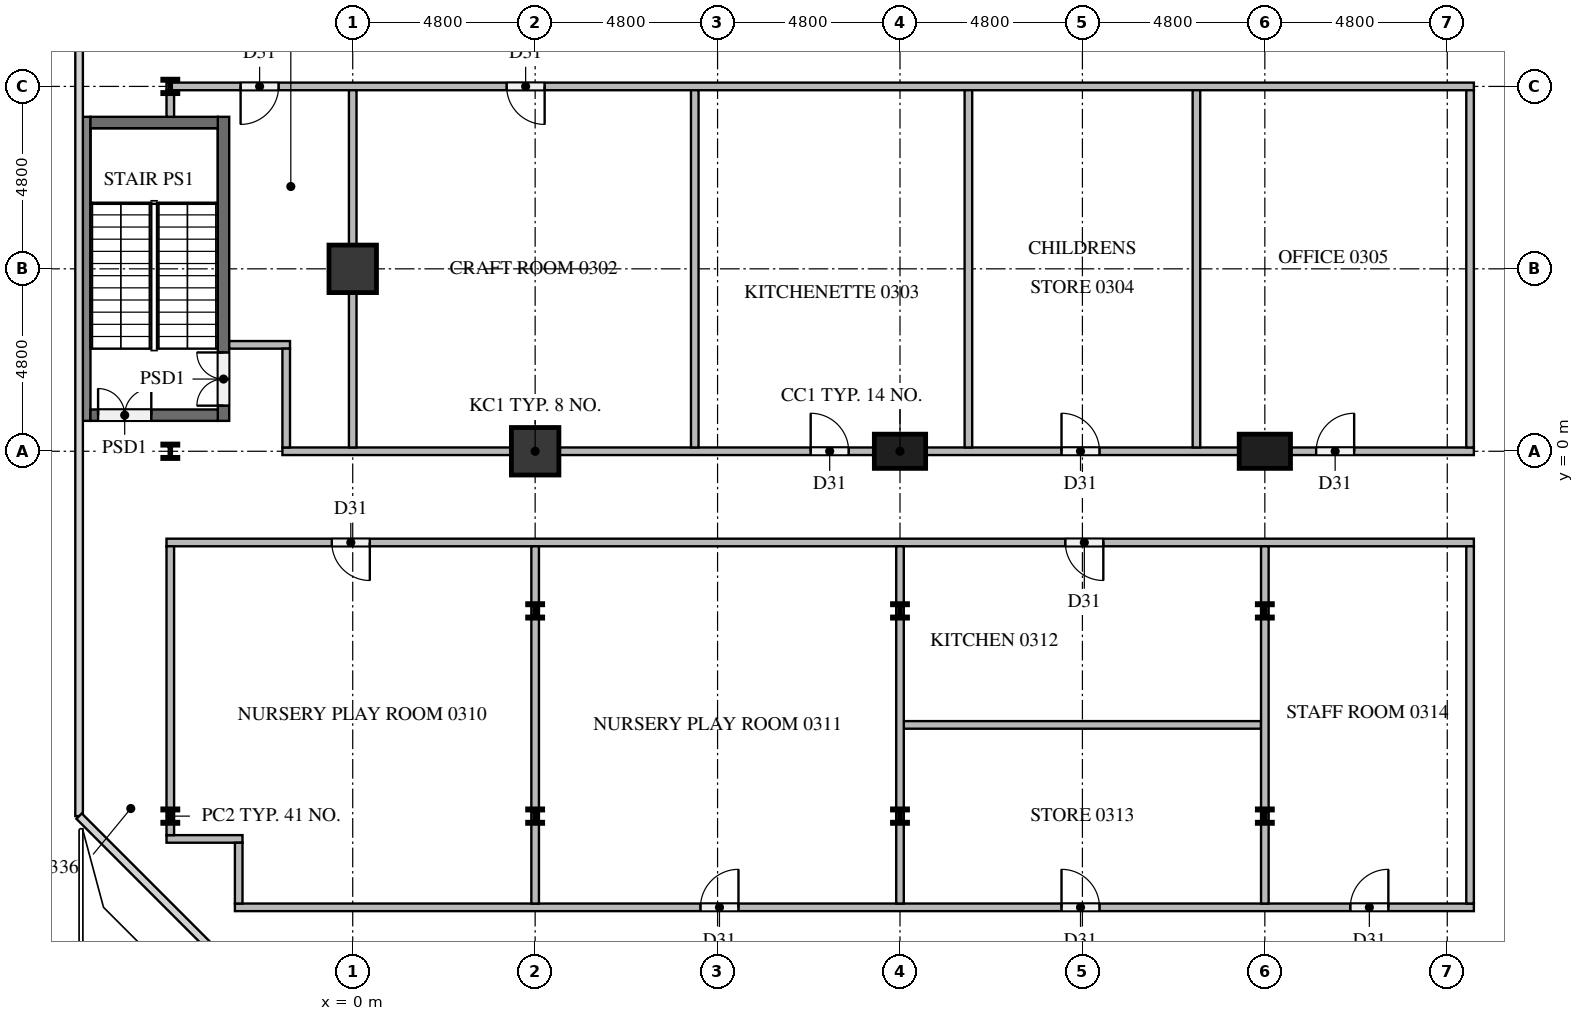
"""IFC4 building model, lengths in metres.
Left out: names, types, materials, properties, quantities, classifications, styles, units other than length and angle.
Written with IfcOpenShell. Run it as: python <this file> out.ifc"""

import sys

from ifc_helpers import new_model, si_unit, direction, frame, frame_2d, origin, origin_2d, place, context, subcontext, project, spatial, rectangle, i_section, extrude, element, fill, save


model = new_model("IFC4")
c1 = context("Model", 3, precision=1e-05, world=origin(), true_north=direction((0.0, 1.0)))
c2 = subcontext(c1, "Body", "Model", "MODEL_VIEW")
j1 = project(units=[si_unit("LENGTHUNIT", "METRE"), si_unit("PLANEANGLEUNIT", "RADIAN")], contexts=[c1])
p1 = place(None, origin())
s1 = spatial("IfcSite", under=j1, at=p1, CompositionType="ELEMENT")
p2 = place(p1, origin())
s2 = spatial("IfcBuilding", under=s1, at=p2, CompositionType="ELEMENT")
p3 = place(p2, frame((0.0, 0.0, 15.0)))
s3 = spatial("IfcBuildingStorey", under=s2, at=p3, CompositionType="ELEMENT", Elevation=15.0)
p4 = place(p3, frame((-7.05, 0.8, 0.0), z_axis=(0.0, 0.0, 1.0), x_axis=(0.0, 1.0, 0.0)))
e1 = element("IfcWall", 1, at=p4, inside=s3, PredefinedType="SOLIDWALL", context=c2, shape_type="SweptSolid", body=[
    extrude(rectangle(XDim=8.0, YDim=0.3, at=frame_2d((4.0, 0.0))), origin(), (0.0, 0.0, 1.0), 4.2),
])
p5 = place(p3, frame((-3.4, 0.8, 0.0), z_axis=(0.0, 0.0, 1.0), x_axis=(0.0, 1.0, 0.0)))
e2 = element("IfcWall", 2, at=p5, inside=s3, PredefinedType="SOLIDWALL", context=c2, shape_type="SweptSolid", body=[
    extrude(rectangle(XDim=8.0, YDim=0.3, at=frame_2d((4.0, 0.0))), origin(), (0.0, 0.0, 1.0), 4.2),
])
p6 = place(p5, frame((0.4, 0.0, 0.0)))
e3 = element("IfcOpeningElement", 3, at=p6, cuts=e2, PredefinedType="OPENING", context=c2, shape_type="SweptSolid", body=[
    extrude(rectangle(XDim=1.4, YDim=2.1, at=frame_2d((0.7, 1.05))), frame((0.0, 0.16, 0.0), z_axis=(0.0, -1.0, 0.0), x_axis=(1.0, 0.0, 0.0)), (0.0, 0.0, 1.0), 0.32),
])
p7 = place(p3, frame((-6.9, 0.95, 0.0), z_axis=(0.0, 0.0, 1.0), x_axis=(1.0, 0.0, 0.0)))
e4 = element("IfcWall", 4, at=p7, inside=s3, PredefinedType="SOLIDWALL", context=c2, shape_type="SweptSolid", body=[
    extrude(rectangle(XDim=3.35, YDim=0.3, at=frame_2d((1.675, 0.0))), origin(), (0.0, 0.0, 1.0), 4.2),
])
p8 = place(p7, frame((0.2, 0.0, 0.0)))
e5 = element("IfcOpeningElement", 5, at=p8, cuts=e4, PredefinedType="OPENING", context=c2, shape_type="SweptSolid", body=[
    extrude(rectangle(XDim=1.4, YDim=2.1, at=frame_2d((0.7, 1.05))), frame((0.0, 0.16, 0.0), z_axis=(0.0, -1.0, 0.0), x_axis=(1.0, 0.0, 0.0)), (0.0, 0.0, 1.0), 0.32),
])
p9 = place(p3, frame((-6.9, 8.65, 0.0), z_axis=(0.0, 0.0, 1.0), x_axis=(1.0, 0.0, 0.0)))
e6 = element("IfcWall", 6, at=p9, inside=s3, PredefinedType="SOLIDWALL", context=c2, shape_type="SweptSolid", body=[
    extrude(rectangle(XDim=3.35, YDim=0.3, at=frame_2d((1.675, 0.0))), origin(), (0.0, 0.0, 1.0), 4.2),
])
p10 = place(p3, frame((4.8, 0.0, 0.0), z_axis=(0.0, 0.0, 1.0), x_axis=(1.0, 0.0, 0.0)))
e7 = element("IfcColumn", 7, at=p10, inside=s3, PredefinedType="COLUMN", context=c2, shape_type="SweptSolid", body=[
    extrude(rectangle(XDim=1.25, YDim=1.25, at=origin_2d()), origin(), (0.0, 0.0, 1.0), 4.2),
])
for number, where, z_axis, x_axis in (
    (8, (14.4, 0.0, 0.0), (0.0, 0.0, 1.0), (1.0, 0.0, 0.0)),
    (9, (24.0, 0.0, 0.0), (0.0, 0.0, 1.0), (1.0, 0.0, 0.0)),
):
    element("IfcColumn", number, at=place(p3, frame(where, z_axis=z_axis, x_axis=x_axis)), inside=s3, PredefinedType="COLUMN", context=c2, shape_type="SweptSolid", body=[
        extrude(rectangle(XDim=1.35, YDim=0.9, at=origin_2d()), origin(), (0.0, 0.0, 1.0), 4.2),
    ])
p11 = place(p3, frame((0.0, 4.8, 0.0), z_axis=(0.0, 0.0, 1.0), x_axis=(1.0, 0.0, 0.0)))
e10 = element("IfcColumn", 10, at=p11, inside=s3, PredefinedType="COLUMN", context=c2, shape_type="SweptSolid", body=[
    extrude(rectangle(XDim=1.25, YDim=1.25, at=origin_2d()), origin(), (0.0, 0.0, 1.0), 4.2),
])
for number, where, z_axis, x_axis in (
    (11, (-4.8, -9.6, 0.0), (0.0, 0.0, 1.0), (1.0, 0.0, 0.0)),
    (12, (-4.8, 0.0, 0.0), (0.0, 0.0, 1.0), (1.0, 0.0, 0.0)),
    (13, (-4.8, 9.6, 0.0), (0.0, 0.0, 1.0), (1.0, 0.0, 0.0)),
    (14, (4.8, -9.6, 0.0), (0.0, 0.0, 1.0), (1.0, 0.0, 0.0)),
    (15, (4.8, -4.2, 0.0), (0.0, 0.0, 1.0), (1.0, 0.0, 0.0)),
    (16, (14.4, -9.6, 0.0), (0.0, 0.0, 1.0), (1.0, 0.0, 0.0)),
    (17, (14.4, -4.2, 0.0), (0.0, 0.0, 1.0), (1.0, 0.0, 0.0)),
    (18, (24.0, -9.6, 0.0), (0.0, 0.0, 1.0), (1.0, 0.0, 0.0)),
    (19, (24.0, -4.2, 0.0), (0.0, 0.0, 1.0), (1.0, 0.0, 0.0)),
):
    element("IfcColumn", number, at=place(p3, frame(where, z_axis=z_axis, x_axis=x_axis)), inside=s3, PredefinedType="COLUMN", context=c2, shape_type="SweptSolid", body=[
        extrude(i_section(OverallWidth=0.396, OverallDepth=0.381, WebThickness=0.019, FlangeThickness=0.03, at=origin_2d()), origin(), (0.0, 0.0, 1.0), 4.2),
    ])
p12 = place(p3, frame((-3.1, -12.0, 0.0), z_axis=(0.0, 0.0, 1.0), x_axis=(1.0, 0.0, 0.0)))
e20 = element("IfcWall", 20, at=p12, inside=s3, PredefinedType="PARTITIONING", context=c2, shape_type="SweptSolid", body=[
    extrude(rectangle(XDim=32.6, YDim=0.2, at=frame_2d((16.3, 0.0))), origin(), (0.0, 0.0, 1.0), 4.2),
])
p13 = place(p12, frame((12.25, 0.0, 0.0)))
e21 = element("IfcOpeningElement", 21, at=p13, cuts=e20, PredefinedType="OPENING", context=c2, shape_type="SweptSolid", body=[
    extrude(rectangle(XDim=1.0, YDim=2.1, at=frame_2d((0.5, 1.05))), frame((0.0, 0.11, 0.0), z_axis=(0.0, -1.0, 0.0), x_axis=(1.0, 0.0, 0.0)), (0.0, 0.0, 1.0), 0.22),
])
p14 = place(p12, frame((21.75, 0.0, 0.0)))
e22 = element("IfcOpeningElement", 22, at=p14, cuts=e20, PredefinedType="OPENING", context=c2, shape_type="SweptSolid", body=[
    extrude(rectangle(XDim=1.0, YDim=2.1, at=frame_2d((0.5, 1.05))), frame((0.0, 0.11, 0.0), z_axis=(0.0, -1.0, 0.0), x_axis=(1.0, 0.0, 0.0)), (0.0, 0.0, 1.0), 0.22),
])
p15 = place(p12, frame((29.35, 0.0, 0.0)))
e23 = element("IfcOpeningElement", 23, at=p15, cuts=e20, PredefinedType="OPENING", context=c2, shape_type="SweptSolid", body=[
    extrude(rectangle(XDim=1.0, YDim=2.1, at=frame_2d((0.5, 1.05))), frame((0.0, 0.11, 0.0), z_axis=(0.0, -1.0, 0.0), x_axis=(1.0, 0.0, 0.0)), (0.0, 0.0, 1.0), 0.22),
])
p16 = place(p3, frame((-4.9, -10.2, 0.0), z_axis=(0.0, 0.0, 1.0), x_axis=(1.0, 0.0, 0.0)))
e24 = element("IfcWall", 24, at=p16, inside=s3, PredefinedType="PARTITIONING", context=c2, shape_type="SweptSolid", body=[
    extrude(rectangle(XDim=2.0, YDim=0.2, at=frame_2d((1.0, 0.0))), origin(), (0.0, 0.0, 1.0), 4.2),
])
p17 = place(p3, frame((14.5, -7.2, 0.0), z_axis=(0.0, 0.0, 1.0), x_axis=(1.0, 0.0, 0.0)))
e25 = element("IfcWall", 25, at=p17, inside=s3, PredefinedType="PARTITIONING", context=c2, shape_type="SweptSolid", body=[
    extrude(rectangle(XDim=9.4, YDim=0.2, at=frame_2d((4.7, 0.0))), origin(), (0.0, 0.0, 1.0), 4.2),
])
p18 = place(p3, frame((29.5, -2.4, 0.0), z_axis=(0.0, 0.0, 1.0), x_axis=(-1.0, 0.0, 0.0)))
e26 = element("IfcWall", 26, at=p18, inside=s3, PredefinedType="PARTITIONING", context=c2, shape_type="SweptSolid", body=[
    extrude(rectangle(XDim=34.4, YDim=0.2, at=frame_2d((17.2, 0.0))), origin(), (0.0, 0.0, 1.0), 4.2),
])
p19 = place(p18, frame((29.05, 0.0, 0.0)))
e27 = element("IfcOpeningElement", 27, at=p19, cuts=e26, PredefinedType="OPENING", context=c2, shape_type="SweptSolid", body=[
    extrude(rectangle(XDim=1.0, YDim=2.1, at=frame_2d((0.5, 1.05))), frame((0.0, 0.11, 0.0), z_axis=(0.0, -1.0, 0.0), x_axis=(1.0, 0.0, 0.0)), (0.0, 0.0, 1.0), 0.22),
])
p20 = place(p18, frame((9.75, 0.0, 0.0)))
e28 = element("IfcOpeningElement", 28, at=p20, cuts=e26, PredefinedType="OPENING", context=c2, shape_type="SweptSolid", body=[
    extrude(rectangle(XDim=1.0, YDim=2.1, at=frame_2d((0.5, 1.05))), frame((0.0, 0.11, 0.0), z_axis=(0.0, -1.0, 0.0), x_axis=(1.0, 0.0, 0.0)), (0.0, 0.0, 1.0), 0.22),
])
p21 = place(p3, frame((-1.85, 0.0, 0.0), z_axis=(0.0, 0.0, 1.0), x_axis=(1.0, 0.0, 0.0)))
e29 = element("IfcWall", 29, at=p21, inside=s3, PredefinedType="PARTITIONING", context=c2, shape_type="SweptSolid", body=[
    extrude(rectangle(XDim=31.35, YDim=0.2, at=frame_2d((15.675, 0.0))), origin(), (0.0, 0.0, 1.0), 4.2),
])
p22 = place(p21, frame((13.9, 0.0, 0.0)))
e30 = element("IfcOpeningElement", 30, at=p22, cuts=e29, PredefinedType="OPENING", context=c2, shape_type="SweptSolid", body=[
    extrude(rectangle(XDim=1.0, YDim=2.1, at=frame_2d((0.5, 1.05))), frame((0.0, 0.11, 0.0), z_axis=(0.0, -1.0, 0.0), x_axis=(1.0, 0.0, 0.0)), (0.0, 0.0, 1.0), 0.22),
])
p23 = place(p21, frame((20.5, 0.0, 0.0)))
e31 = element("IfcOpeningElement", 31, at=p23, cuts=e29, PredefinedType="OPENING", context=c2, shape_type="SweptSolid", body=[
    extrude(rectangle(XDim=1.0, YDim=2.1, at=frame_2d((0.5, 1.05))), frame((0.0, 0.11, 0.0), z_axis=(0.0, -1.0, 0.0), x_axis=(1.0, 0.0, 0.0)), (0.0, 0.0, 1.0), 0.22),
])
p24 = place(p21, frame((27.2, 0.0, 0.0)))
e32 = element("IfcOpeningElement", 32, at=p24, cuts=e29, PredefinedType="OPENING", context=c2, shape_type="SweptSolid", body=[
    extrude(rectangle(XDim=1.0, YDim=2.1, at=frame_2d((0.5, 1.05))), frame((0.0, 0.11, 0.0), z_axis=(0.0, -1.0, 0.0), x_axis=(1.0, 0.0, 0.0)), (0.0, 0.0, 1.0), 0.22),
])
p25 = place(p3, frame((-3.25, 2.8, 0.0), z_axis=(0.0, 0.0, 1.0), x_axis=(1.0, 0.0, 0.0)))
e33 = element("IfcWall", 33, at=p25, inside=s3, PredefinedType="PARTITIONING", context=c2, shape_type="SweptSolid", body=[
    extrude(rectangle(XDim=1.6, YDim=0.2, at=frame_2d((0.8, 0.0))), origin(), (0.0, 0.0, 1.0), 4.2),
])
p26 = place(p3, frame((29.5, 9.6, 0.0), z_axis=(0.0, 0.0, 1.0), x_axis=(-1.0, 0.0, 0.0)))
e34 = element("IfcWall", 34, at=p26, inside=s3, PredefinedType="PARTITIONING", context=c2, shape_type="SweptSolid", body=[
    extrude(rectangle(XDim=34.4, YDim=0.2, at=frame_2d((17.2, 0.0))), origin(), (0.0, 0.0, 1.0), 4.2),
])
p27 = place(p26, frame((31.45, 0.0, 0.0)))
e35 = element("IfcOpeningElement", 35, at=p27, cuts=e34, PredefinedType="OPENING", context=c2, shape_type="SweptSolid", body=[
    extrude(rectangle(XDim=1.0, YDim=2.1, at=frame_2d((0.5, 1.05))), frame((0.0, 0.11, 0.0), z_axis=(0.0, -1.0, 0.0), x_axis=(1.0, 0.0, 0.0)), (0.0, 0.0, 1.0), 0.22),
])
p28 = place(p26, frame((24.45, 0.0, 0.0)))
e36 = element("IfcOpeningElement", 36, at=p28, cuts=e34, PredefinedType="OPENING", context=c2, shape_type="SweptSolid", body=[
    extrude(rectangle(XDim=1.0, YDim=2.1, at=frame_2d((0.5, 1.05))), frame((0.0, 0.11, 0.0), z_axis=(0.0, -1.0, 0.0), x_axis=(1.0, 0.0, 0.0)), (0.0, 0.0, 1.0), 0.22),
])
p29 = place(p3, frame((-4.8, -10.1, 0.0), z_axis=(0.0, 0.0, 1.0), x_axis=(0.0, 1.0, 0.0)))
e37 = element("IfcWall", 37, at=p29, inside=s3, PredefinedType="PARTITIONING", context=c2, shape_type="SweptSolid", body=[
    extrude(rectangle(XDim=7.6, YDim=0.2, at=frame_2d((3.8, 0.0))), origin(), (0.0, 0.0, 1.0), 4.2),
])
p30 = place(p3, frame((-4.8, 8.8, 0.0), z_axis=(0.0, 0.0, 1.0), x_axis=(0.0, 1.0, 0.0)))
e38 = element("IfcWall", 38, at=p30, inside=s3, PredefinedType="PARTITIONING", context=c2, shape_type="SweptSolid", body=[
    extrude(rectangle(XDim=0.7, YDim=0.2, at=frame_2d((0.35, 0.0))), origin(), (0.0, 0.0, 1.0), 4.2),
])
p31 = place(p3, frame((-3.0, -11.9, 0.0), z_axis=(0.0, 0.0, 1.0), x_axis=(0.0, 1.0, 0.0)))
e39 = element("IfcWall", 39, at=p31, inside=s3, PredefinedType="PARTITIONING", context=c2, shape_type="SweptSolid", body=[
    extrude(rectangle(XDim=1.6, YDim=0.2, at=frame_2d((0.8, 0.0))), origin(), (0.0, 0.0, 1.0), 4.2),
])
p32 = place(p3, frame((-1.75, 0.1, 0.0), z_axis=(0.0, 0.0, 1.0), x_axis=(0.0, 1.0, 0.0)))
e40 = element("IfcWall", 40, at=p32, inside=s3, PredefinedType="PARTITIONING", context=c2, shape_type="SweptSolid", body=[
    extrude(rectangle(XDim=2.6, YDim=0.2, at=frame_2d((1.3, 0.0))), origin(), (0.0, 0.0, 1.0), 4.2),
])
for number, where, z_axis, x_axis in (
    (41, (0.0, 0.1, 0.0), (0.0, 0.0, 1.0), (0.0, 1.0, 0.0)),
    (42, (4.8, -11.9, 0.0), (0.0, 0.0, 1.0), (0.0, 1.0, 0.0)),
    (43, (9.0, 0.1, 0.0), (0.0, 0.0, 1.0), (0.0, 1.0, 0.0)),
    (44, (14.4, -11.9, 0.0), (0.0, 0.0, 1.0), (0.0, 1.0, 0.0)),
    (45, (16.2, 0.1, 0.0), (0.0, 0.0, 1.0), (0.0, 1.0, 0.0)),
    (46, (22.2, 0.1, 0.0), (0.0, 0.0, 1.0), (0.0, 1.0, 0.0)),
    (47, (24.0, -11.9, 0.0), (0.0, 0.0, 1.0), (0.0, 1.0, 0.0)),
    (48, (29.4, -11.9, 0.0), (0.0, 0.0, 1.0), (0.0, 1.0, 0.0)),
    (49, (29.4, 0.1, 0.0), (0.0, 0.0, 1.0), (0.0, 1.0, 0.0)),
):
    element("IfcWall", number, at=place(p3, frame(where, z_axis=z_axis, x_axis=x_axis)), inside=s3, PredefinedType="PARTITIONING", context=c2, shape_type="SweptSolid", body=[
        extrude(rectangle(XDim=9.4, YDim=0.2, at=frame_2d((4.7, 0.0))), origin(), (0.0, 0.0, 1.0), 4.2),
    ])
p33 = place(p6, origin())
e50 = element("IfcDoor", 50, at=p33, inside=s3, OperationType="DOUBLE_DOOR_SINGLE_SWING", PredefinedType="DOOR", context=c2, shape_type="SweptSolid", body=[
    extrude(rectangle(XDim=1.4, YDim=2.1, at=frame_2d((0.7, 1.05))), frame((0.0, 0.025, 0.0), z_axis=(0.0, -1.0, 0.0), x_axis=(1.0, 0.0, 0.0)), (0.0, 0.0, 1.0), 0.05),
])
fill(e3, e50)
p34 = place(p8, origin())
e51 = element("IfcDoor", 51, at=p34, inside=s3, OperationType="DOUBLE_DOOR_SINGLE_SWING", PredefinedType="DOOR", context=c2, shape_type="SweptSolid", body=[
    extrude(rectangle(XDim=1.4, YDim=2.1, at=frame_2d((0.7, 1.05))), frame((0.0, 0.025, 0.0), z_axis=(0.0, -1.0, 0.0), x_axis=(1.0, 0.0, 0.0)), (0.0, 0.0, 1.0), 0.05),
])
fill(e5, e51)
p35 = place(p27, origin())
e52 = element("IfcDoor", 52, at=p35, inside=s3, OperationType="SINGLE_SWING_RIGHT", PredefinedType="DOOR", context=c2, shape_type="SweptSolid", body=[
    extrude(rectangle(XDim=1.0, YDim=2.1, at=frame_2d((0.5, 1.05))), frame((0.0, 0.025, 0.0), z_axis=(0.0, -1.0, 0.0), x_axis=(1.0, 0.0, 0.0)), (0.0, 0.0, 1.0), 0.05),
])
fill(e35, e52)
p36 = place(p28, origin())
e53 = element("IfcDoor", 53, at=p36, inside=s3, OperationType="SINGLE_SWING_LEFT", PredefinedType="DOOR", context=c2, shape_type="SweptSolid", body=[
    extrude(rectangle(XDim=1.0, YDim=2.1, at=frame_2d((0.5, 1.05))), frame((0.0, 0.025, 0.0), z_axis=(0.0, -1.0, 0.0), x_axis=(1.0, 0.0, 0.0)), (0.0, 0.0, 1.0), 0.05),
])
fill(e36, e53)
p37 = place(p22, origin())
e54 = element("IfcDoor", 54, at=p37, inside=s3, OperationType="SINGLE_SWING_LEFT", PredefinedType="DOOR", context=c2, shape_type="SweptSolid", body=[
    extrude(rectangle(XDim=1.0, YDim=2.1, at=frame_2d((0.5, 1.05))), frame((0.0, 0.025, 0.0), z_axis=(0.0, -1.0, 0.0), x_axis=(1.0, 0.0, 0.0)), (0.0, 0.0, 1.0), 0.05),
])
fill(e30, e54)
p38 = place(p23, origin())
e55 = element("IfcDoor", 55, at=p38, inside=s3, OperationType="SINGLE_SWING_LEFT", PredefinedType="DOOR", context=c2, shape_type="SweptSolid", body=[
    extrude(rectangle(XDim=1.0, YDim=2.1, at=frame_2d((0.5, 1.05))), frame((0.0, 0.025, 0.0), z_axis=(0.0, -1.0, 0.0), x_axis=(1.0, 0.0, 0.0)), (0.0, 0.0, 1.0), 0.05),
])
fill(e31, e55)
p39 = place(p24, origin())
e56 = element("IfcDoor", 56, at=p39, inside=s3, OperationType="SINGLE_SWING_RIGHT", PredefinedType="DOOR", context=c2, shape_type="SweptSolid", body=[
    extrude(rectangle(XDim=1.0, YDim=2.1, at=frame_2d((0.5, 1.05))), frame((0.0, 0.025, 0.0), z_axis=(0.0, -1.0, 0.0), x_axis=(1.0, 0.0, 0.0)), (0.0, 0.0, 1.0), 0.05),
])
fill(e32, e56)
p40 = place(p19, origin())
e57 = element("IfcDoor", 57, at=p40, inside=s3, OperationType="SINGLE_SWING_LEFT", PredefinedType="DOOR", context=c2, shape_type="SweptSolid", body=[
    extrude(rectangle(XDim=1.0, YDim=2.1, at=frame_2d((0.5, 1.05))), frame((0.0, 0.025, 0.0), z_axis=(0.0, -1.0, 0.0), x_axis=(1.0, 0.0, 0.0)), (0.0, 0.0, 1.0), 0.05),
])
fill(e27, e57)
p41 = place(p13, origin())
e58 = element("IfcDoor", 58, at=p41, inside=s3, OperationType="SINGLE_SWING_RIGHT", PredefinedType="DOOR", context=c2, shape_type="SweptSolid", body=[
    extrude(rectangle(XDim=1.0, YDim=2.1, at=frame_2d((0.5, 1.05))), frame((0.0, 0.025, 0.0), z_axis=(0.0, -1.0, 0.0), x_axis=(1.0, 0.0, 0.0)), (0.0, 0.0, 1.0), 0.05),
])
fill(e21, e58)
p42 = place(p20, origin())
e59 = element("IfcDoor", 59, at=p42, inside=s3, OperationType="SINGLE_SWING_LEFT", PredefinedType="DOOR", context=c2, shape_type="SweptSolid", body=[
    extrude(rectangle(XDim=1.0, YDim=2.1, at=frame_2d((0.5, 1.05))), frame((0.0, 0.025, 0.0), z_axis=(0.0, -1.0, 0.0), x_axis=(1.0, 0.0, 0.0)), (0.0, 0.0, 1.0), 0.05),
])
fill(e28, e59)
p43 = place(p14, origin())
e60 = element("IfcDoor", 60, at=p43, inside=s3, OperationType="SINGLE_SWING_LEFT", PredefinedType="DOOR", context=c2, shape_type="SweptSolid", body=[
    extrude(rectangle(XDim=1.0, YDim=2.1, at=frame_2d((0.5, 1.05))), frame((0.0, 0.025, 0.0), z_axis=(0.0, -1.0, 0.0), x_axis=(1.0, 0.0, 0.0)), (0.0, 0.0, 1.0), 0.05),
])
fill(e22, e60)
p44 = place(p15, origin())
e61 = element("IfcDoor", 61, at=p44, inside=s3, OperationType="SINGLE_SWING_RIGHT", PredefinedType="DOOR", context=c2, shape_type="SweptSolid", body=[
    extrude(rectangle(XDim=1.0, YDim=2.1, at=frame_2d((0.5, 1.05))), frame((0.0, 0.025, 0.0), z_axis=(0.0, -1.0, 0.0), x_axis=(1.0, 0.0, 0.0)), (0.0, 0.0, 1.0), 0.05),
])
fill(e23, e61)
save(model, sys.argv[1])
